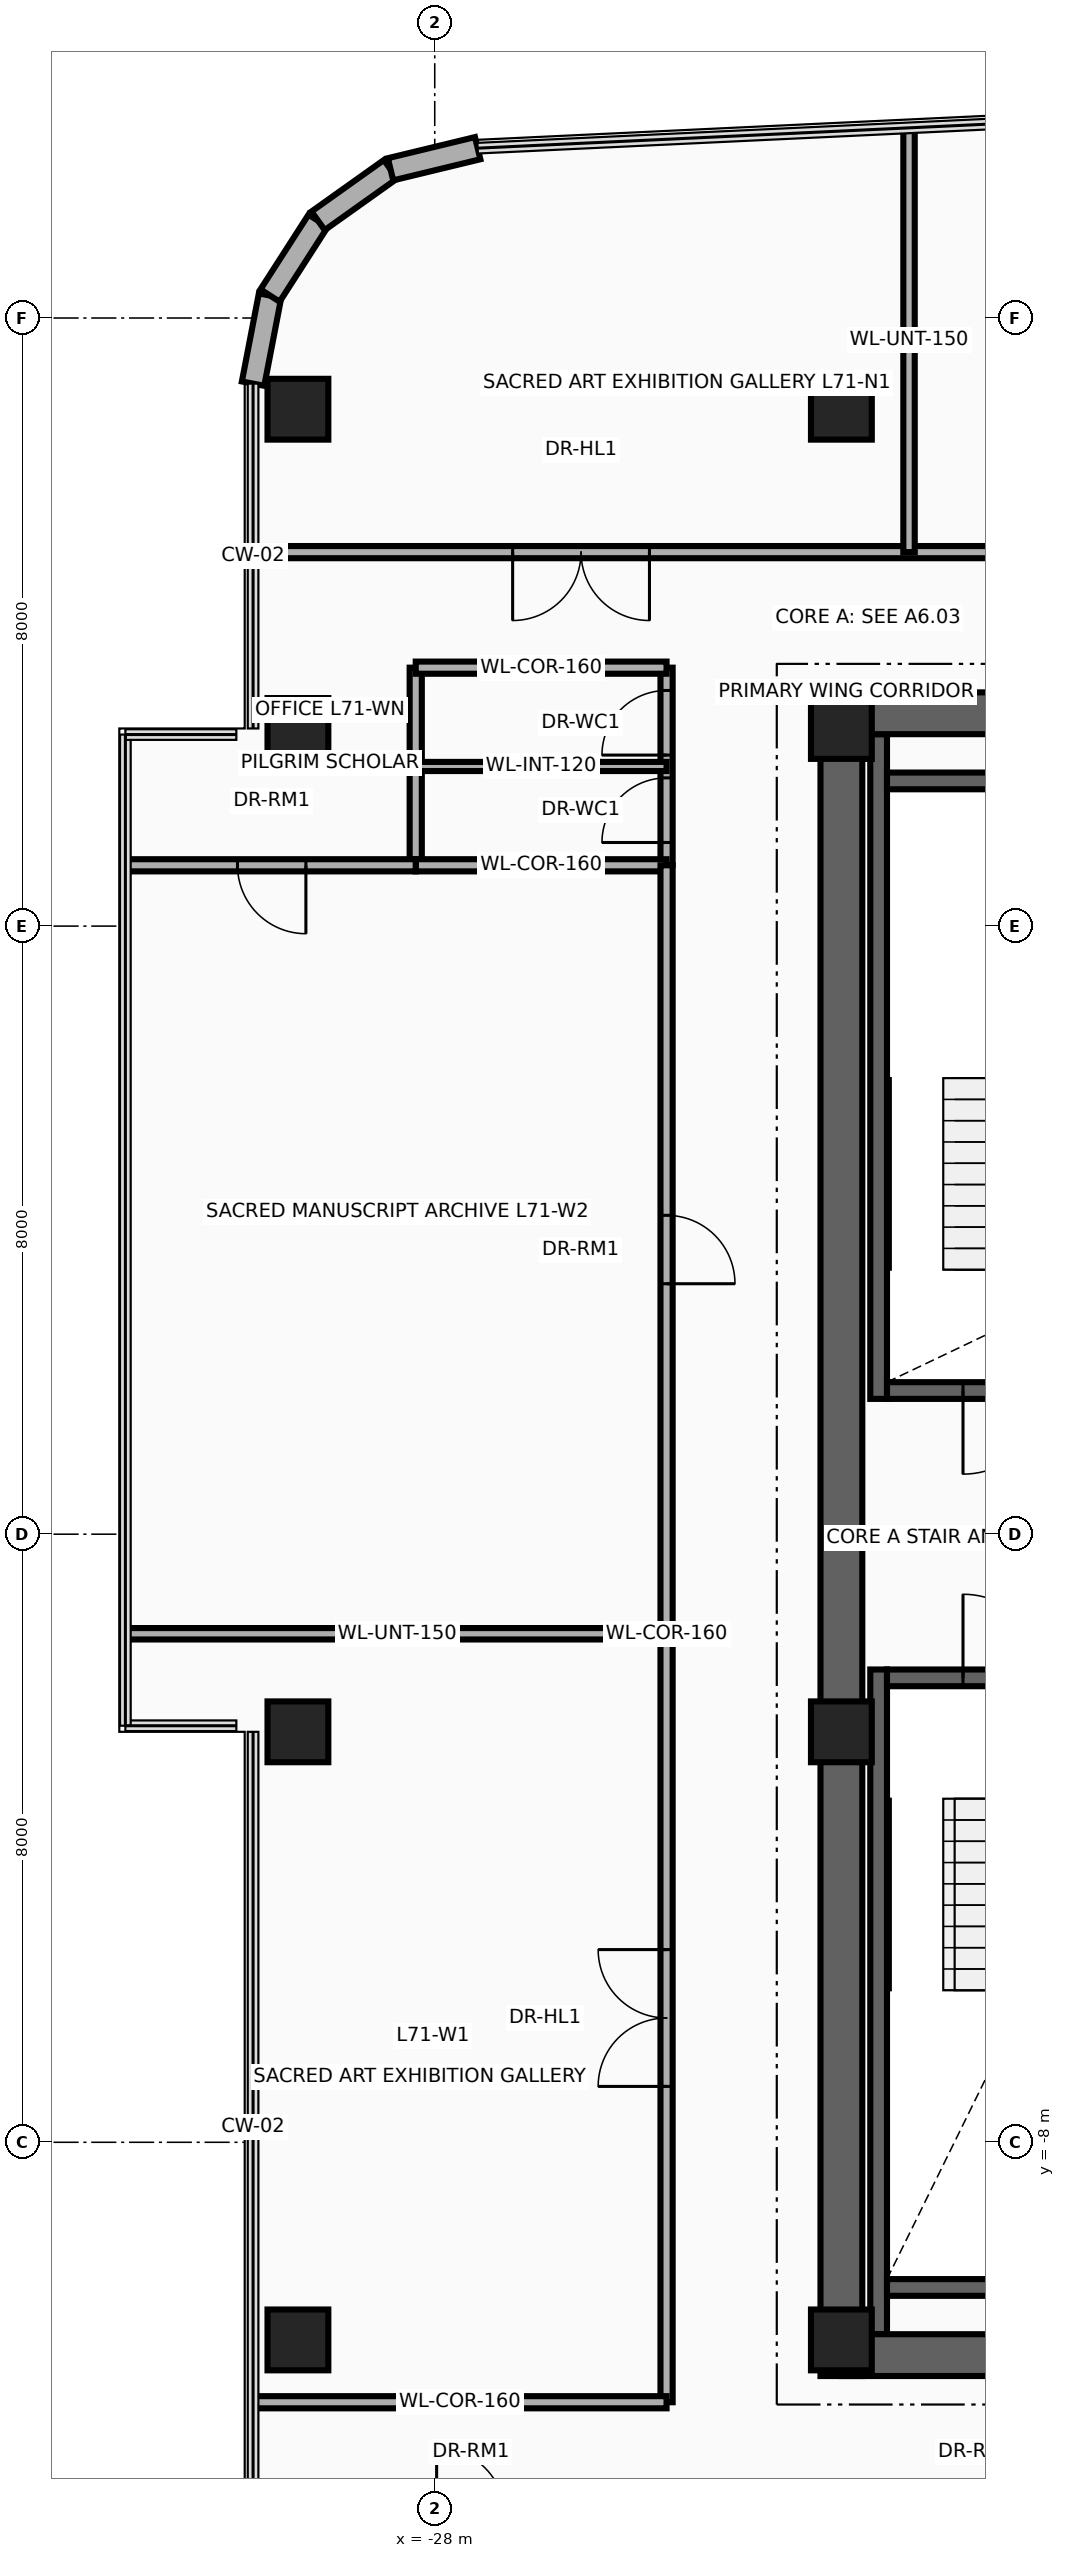
"""IFC4 building model, lengths in metres.
Left out: names, types, materials, properties, quantities, classifications, styles, units other than length and angle.
Written with IfcOpenShell. Run it as: python <this file> out.ifc"""

import sys

from ifc_helpers import new_model, si_unit, direction, frame, frame_2d, origin, origin_2d, place, context, subcontext, project, spatial, rectangle, extrude, source, transform, mapped, element, fill, save


model = new_model("IFC4")
c1 = context("Model", 3, precision=1e-05, world=origin(), true_north=direction((0.0, 1.0)))
c2 = subcontext(c1, "Body", "Model", "MODEL_VIEW")
j1 = project(units=[si_unit("LENGTHUNIT", "METRE"), si_unit("PLANEANGLEUNIT", "RADIAN")], contexts=[c1])
p1 = place(None, origin())
s1 = spatial("IfcSite", under=j1, at=p1, CompositionType="ELEMENT")
p2 = place(p1, origin())
s2 = spatial("IfcBuilding", under=s1, at=p2, CompositionType="ELEMENT")
p3 = place(p2, frame((0.0, 0.0, 273.0)))
s3 = spatial("IfcBuildingStorey", under=s2, at=p3, CompositionType="ELEMENT", Elevation=273.0)
p4 = place(p3, frame((-22.16, 1.78, 0.0), z_axis=(0.0, 0.0, 1.0), x_axis=(0.0, 1.0, 0.0)))
e1 = element("IfcWall", 1, at=p4, inside=s3, PredefinedType="SHEAR", context=c2, shape_type="SweptSolid", body=[
    extrude(rectangle(XDim=8.745, YDim=0.22, at=frame_2d((4.373, 0.0))), origin(), (0.0, 0.0, 1.0), 3.26),
])
p5 = place(p3, frame((-22.05, 1.89, 0.0), z_axis=(0.0, 0.0, 1.0), x_axis=(1.0, 0.0, 0.0)))
e2 = element("IfcWall", 2, at=p5, inside=s3, PredefinedType="SHEAR", context=c2, shape_type="SweptSolid", body=[
    extrude(rectangle(XDim=3.11, YDim=0.22, at=frame_2d((1.555, 0.0))), origin(), (0.0, 0.0, 1.0), 3.26),
])
p6 = place(p5, frame((1.0, 0.0, 0.0)))
e3 = element("IfcOpeningElement", 3, at=p6, cuts=e2, PredefinedType="OPENING", context=c2, shape_type="SweptSolid", body=[
    extrude(rectangle(XDim=1.1, YDim=2.15, at=frame_2d((0.55, 1.075))), frame((0.0, 0.125, 0.0), z_axis=(0.0, -1.0, 0.0), x_axis=(1.0, 0.0, 0.0)), (0.0, 0.0, 1.0), 0.25),
])
p7 = place(p3, frame((-22.05, 9.91, 0.0), z_axis=(0.0, 0.0, 1.0), x_axis=(1.0, 0.0, 0.0)))
e4 = element("IfcWall", 4, at=p7, inside=s3, PredefinedType="SHEAR", context=c2, shape_type="SweptSolid", body=[
    extrude(rectangle(XDim=3.11, YDim=0.22, at=frame_2d((1.555, 0.0))), origin(), (0.0, 0.0, 1.0), 3.26),
])
p8 = place(p3, frame((-22.16, -10.525, 0.0), z_axis=(0.0, 0.0, 1.0), x_axis=(0.0, 1.0, 0.0)))
e5 = element("IfcWall", 5, at=p8, inside=s3, PredefinedType="SHEAR", context=c2, shape_type="SweptSolid", body=[
    extrude(rectangle(XDim=8.745, YDim=0.22, at=frame_2d((4.373, 0.0))), origin(), (0.0, 0.0, 1.0), 3.26),
])
p9 = place(p3, frame((-22.05, -9.91, 0.0), z_axis=(0.0, 0.0, 1.0), x_axis=(1.0, 0.0, 0.0)))
e6 = element("IfcWall", 6, at=p9, inside=s3, PredefinedType="SHEAR", context=c2, shape_type="SweptSolid", body=[
    extrude(rectangle(XDim=3.11, YDim=0.22, at=frame_2d((1.555, 0.0))), origin(), (0.0, 0.0, 1.0), 3.26),
])
p10 = place(p3, frame((-22.05, -1.89, 0.0), z_axis=(0.0, 0.0, 1.0), x_axis=(1.0, 0.0, 0.0)))
e7 = element("IfcWall", 7, at=p10, inside=s3, PredefinedType="SHEAR", context=c2, shape_type="SweptSolid", body=[
    extrude(rectangle(XDim=3.11, YDim=0.22, at=frame_2d((1.555, 0.0))), origin(), (0.0, 0.0, 1.0), 3.26),
])
p11 = place(p10, frame((1.0, 0.0, 0.0)))
e8 = element("IfcOpeningElement", 8, at=p11, cuts=e7, PredefinedType="OPENING", context=c2, shape_type="SweptSolid", body=[
    extrude(rectangle(XDim=1.1, YDim=2.15, at=frame_2d((0.55, 1.075))), frame((0.0, 0.125, 0.0), z_axis=(0.0, -1.0, 0.0), x_axis=(1.0, 0.0, 0.0)), (0.0, 0.0, 1.0), 0.25),
])
p12 = place(p3, frame((-22.65, -11.075, 0.0), z_axis=(0.0, 0.0, 1.0), x_axis=(0.0, 1.0, 0.0)))
e9 = element("IfcWall", 9, at=p12, inside=s3, PredefinedType="SHEAR", context=c2, shape_type="SweptSolid", body=[
    extrude(rectangle(XDim=22.15, YDim=0.55, at=frame_2d((11.075, 0.0))), origin(), (0.0, 0.0, 1.0), 3.26),
])
for number, where, z_axis, x_axis in (
    (10, (-22.65, 10.8, 0.0), (0.0, 0.0, 1.0), (1.0, 0.0, 0.0)),
    (11, (-22.65, -10.8, 0.0), (0.0, 0.0, 1.0), (1.0, 0.0, 0.0)),
):
    element("IfcWall", number, at=place(p3, frame(where, z_axis=z_axis, x_axis=x_axis)), inside=s3, PredefinedType="SHEAR", context=c2, shape_type="SweptSolid", body=[
        extrude(rectangle(XDim=10.25, YDim=0.55, at=frame_2d((5.125, 0.0))), origin(), (0.0, 0.0, 1.0), 3.26),
    ])
m1 = source(origin(), c2, "Body", "SweptSolid", [
    extrude(rectangle(XDim=0.8, YDim=0.8, at=origin_2d()), origin(), (0.0, 0.0, 1.0), 3.5),
])
for number, where, z_axis, x_axis in (
    (12, (-29.8, -10.6, 0.0), (0.0, 0.0, 1.0), (1.0, 0.0, 0.0)),
    (13, (-22.65, -10.6, 0.0), (0.0, 0.0, 1.0), (1.0, 0.0, 0.0)),
    (14, (-29.8, -2.6, 0.0), (0.0, 0.0, 1.0), (1.0, 0.0, 0.0)),
    (15, (-22.65, -2.6, 0.0), (0.0, 0.0, 1.0), (1.0, 0.0, 0.0)),
    (16, (-29.8, 10.6, 0.0), (0.0, 0.0, 1.0), (1.0, 0.0, 0.0)),
    (17, (-22.65, 10.6, 0.0), (0.0, 0.0, 1.0), (1.0, 0.0, 0.0)),
    (18, (-29.8, 14.8, 0.0), (0.0, 0.0, 1.0), (1.0, 0.0, 0.0)),
    (19, (-22.65, 14.8, 0.0), (0.0, 0.0, 1.0), (1.0, 0.0, 0.0)),
):
    element("IfcColumn", number, at=place(p3, frame(where, z_axis=z_axis, x_axis=x_axis)), inside=s3, PredefinedType="COLUMN", context=c2, shape_type="MappedRepresentation", body=[
        mapped(m1, transform((0.0, 0.0, 0.0), x_axis=(1.0, 0.0, 0.0), y_axis=(0.0, 1.0, 0.0), z_axis=(0.0, 0.0, 1.0), scale=1.0)),
    ])
p13 = place(p3, frame((-30.39, 15.137, 0.0), z_axis=(0.0, 0.0, 1.0), x_axis=(0.189307792679, 0.981917796779, 0.0)))
e20 = element("IfcWall", 20, at=p13, inside=s3, PredefinedType="SOLIDWALL", context=c2, shape_type="SweptSolid", body=[
    extrude(rectangle(XDim=1.18, YDim=0.3, at=frame_2d((0.59, 0.0))), origin(), (0.0, 0.0, 1.0), 3.26),
])
p14 = place(p3, frame((-30.167, 16.295, 0.0), z_axis=(0.0, 0.0, 1.0), x_axis=(0.540842020947, 0.841124193195, 0.0)))
e21 = element("IfcWall", 21, at=p14, inside=s3, PredefinedType="SOLIDWALL", context=c2, shape_type="SweptSolid", body=[
    extrude(rectangle(XDim=1.169, YDim=0.3, at=frame_2d((0.584, 0.0))), origin(), (0.0, 0.0, 1.0), 3.26),
])
p15 = place(p3, frame((-29.534, 17.279, 0.0), z_axis=(0.0, 0.0, 1.0), x_axis=(0.81466371606, 0.579933642527, 0.0)))
e22 = element("IfcWall", 22, at=p15, inside=s3, PredefinedType="SOLIDWALL", context=c2, shape_type="SweptSolid", body=[
    extrude(rectangle(XDim=1.169, YDim=0.3, at=frame_2d((0.584, 0.0))), origin(), (0.0, 0.0, 1.0), 3.26),
])
p16 = place(p3, frame((-28.582, 17.957, 0.0), z_axis=(0.0, 0.0, 1.0), x_axis=(0.971929016595, 0.235274279725, 0.0)))
e23 = element("IfcWall", 23, at=p16, inside=s3, PredefinedType="SOLIDWALL", context=c2, shape_type="SweptSolid", body=[
    extrude(rectangle(XDim=1.18, YDim=0.3, at=frame_2d((0.59, 0.0))), origin(), (0.0, 0.0, 1.0), 3.26),
])
p17 = place(p3, frame((-28.25, 8.8, 0.0), z_axis=(0.0, 0.0, 1.0), x_axis=(0.0, 1.0, 0.0)))
e24 = element("IfcWall", 24, at=p17, inside=s3, PredefinedType="PARTITIONING", context=c2, shape_type="SweptSolid", body=[
    extrude(rectangle(XDim=2.6, YDim=0.16, at=frame_2d((1.3, 0.0))), origin(), (0.0, 0.0, 1.0), 2.623),
])
p18 = place(p3, frame((-24.95, 8.8, 0.0), z_axis=(0.0, 0.0, 1.0), x_axis=(0.0, 1.0, 0.0)))
e25 = element("IfcWall", 25, at=p18, inside=s3, PredefinedType="PARTITIONING", context=c2, shape_type="SweptSolid", body=[
    extrude(rectangle(XDim=2.6, YDim=0.16, at=frame_2d((1.3, 0.0))), origin(), (0.0, 0.0, 1.0), 2.623),
])
p19 = place(p18, frame((0.3, 0.0, 0.0)))
e26 = element("IfcOpeningElement", 26, at=p19, cuts=e25, PredefinedType="OPENING", context=c2, shape_type="SweptSolid", body=[
    extrude(rectangle(XDim=0.85, YDim=2.1, at=frame_2d((0.425, 1.05))), frame((0.0, 0.095, 0.0), z_axis=(0.0, -1.0, 0.0), x_axis=(1.0, 0.0, 0.0)), (0.0, 0.0, 1.0), 0.19),
])
p20 = place(p18, frame((1.45, 0.0, 0.0)))
e27 = element("IfcOpeningElement", 27, at=p20, cuts=e25, PredefinedType="OPENING", context=c2, shape_type="SweptSolid", body=[
    extrude(rectangle(XDim=0.85, YDim=2.1, at=frame_2d((0.425, 1.05))), frame((0.0, 0.095, 0.0), z_axis=(0.0, -1.0, 0.0), x_axis=(1.0, 0.0, 0.0)), (0.0, 0.0, 1.0), 0.19),
])
for number, where, z_axis, x_axis in (
    (28, (-28.25, 8.8, 0.0), (0.0, 0.0, 1.0), (1.0, 0.0, 0.0)),
    (29, (-28.25, 11.4, 0.0), (0.0, 0.0, 1.0), (1.0, 0.0, 0.0)),
):
    element("IfcWall", number, at=place(p3, frame(where, z_axis=z_axis, x_axis=x_axis)), inside=s3, PredefinedType="PARTITIONING", context=c2, shape_type="SweptSolid", body=[
        extrude(rectangle(XDim=3.3, YDim=0.16, at=frame_2d((1.65, 0.0))), origin(), (0.0, 0.0, 1.0), 3.26),
    ])
p21 = place(p3, frame((-28.25, 10.1, 0.0), z_axis=(0.0, 0.0, 1.0), x_axis=(1.0, 0.0, 0.0)))
e30 = element("IfcWall", 30, at=p21, inside=s3, PredefinedType="PARTITIONING", context=c2, shape_type="SweptSolid", body=[
    extrude(rectangle(XDim=3.3, YDim=0.12, at=frame_2d((1.65, 0.0))), origin(), (0.0, 0.0, 1.0), 3.26),
])
p22 = place(p3, frame((-24.95, -11.42, 0.0), z_axis=(0.0, 0.0, 1.0), x_axis=(0.0, 1.0, 0.0)))
e31 = element("IfcWall", 31, at=p22, inside=s3, PredefinedType="PARTITIONING", context=c2, shape_type="SweptSolid", body=[
    extrude(rectangle(XDim=20.22, YDim=0.16, at=frame_2d((10.11, 0.0))), origin(), (0.0, 0.0, 1.0), 2.623),
])
p23 = place(p22, frame((4.155, 0.0, 0.0)))
e32 = element("IfcOpeningElement", 32, at=p23, cuts=e31, PredefinedType="OPENING", context=c2, shape_type="SweptSolid", body=[
    extrude(rectangle(XDim=1.8, YDim=2.15, at=frame_2d((0.9, 1.075))), frame((0.0, 0.095, 0.0), z_axis=(0.0, -1.0, 0.0), x_axis=(1.0, 0.0, 0.0)), (0.0, 0.0, 1.0), 0.19),
])
p24 = place(p22, frame((14.715, 0.0, 0.0)))
e33 = element("IfcOpeningElement", 33, at=p24, cuts=e31, PredefinedType="OPENING", context=c2, shape_type="SweptSolid", body=[
    extrude(rectangle(XDim=0.9, YDim=2.1, at=frame_2d((0.45, 1.05))), frame((0.0, 0.095, 0.0), z_axis=(0.0, -1.0, 0.0), x_axis=(1.0, 0.0, 0.0)), (0.0, 0.0, 1.0), 0.19),
])
p25 = place(p3, frame((-32.04, 8.8, 0.0), z_axis=(0.0, 0.0, 1.0), x_axis=(1.0, 0.0, 0.0)))
e34 = element("IfcWall", 34, at=p25, inside=s3, PredefinedType="PARTITIONING", context=c2, shape_type="SweptSolid", body=[
    extrude(rectangle(XDim=3.79, YDim=0.16, at=frame_2d((1.895, 0.0))), origin(), (0.0, 0.0, 1.0), 2.706),
])
p26 = place(p25, frame((1.445, 0.0, 0.0)))
e35 = element("IfcOpeningElement", 35, at=p26, cuts=e34, PredefinedType="OPENING", context=c2, shape_type="SweptSolid", body=[
    extrude(rectangle(XDim=0.9, YDim=2.1, at=frame_2d((0.45, 1.05))), frame((0.0, 0.095, 0.0), z_axis=(0.0, -1.0, 0.0), x_axis=(1.0, 0.0, 0.0)), (0.0, 0.0, 1.0), 0.19),
])
p27 = place(p3, frame((-32.04, -1.31, 0.0), z_axis=(0.0, 0.0, 1.0), x_axis=(1.0, 0.0, 0.0)))
e36 = element("IfcWall", 36, at=p27, inside=s3, PredefinedType="PARTITIONING", context=c2, shape_type="SweptSolid", body=[
    extrude(rectangle(XDim=7.09, YDim=0.15, at=frame_2d((3.545, 0.0))), origin(), (0.0, 0.0, 1.0), 2.706),
])
p28 = place(p3, frame((-30.39, 12.92, 0.0), z_axis=(0.0, 0.0, 1.0), x_axis=(1.0, 0.0, 0.0)))
e37 = element("IfcWall", 37, at=p28, inside=s3, PredefinedType="PARTITIONING", context=c2, shape_type="SweptSolid", body=[
    extrude(rectangle(XDim=29.48, YDim=0.16, at=frame_2d((14.74, 0.0))), origin(), (0.0, 0.0, 1.0), 2.634),
])
p29 = place(p28, frame((3.415, 0.0, 0.0)))
e38 = element("IfcOpeningElement", 38, at=p29, cuts=e37, PredefinedType="OPENING", context=c2, shape_type="SweptSolid", body=[
    extrude(rectangle(XDim=1.8, YDim=2.15, at=frame_2d((0.9, 1.075))), frame((0.0, 0.095, 0.0), z_axis=(0.0, -1.0, 0.0), x_axis=(1.0, 0.0, 0.0)), (0.0, 0.0, 1.0), 0.19),
])
p30 = place(p28, frame((12.97, 0.0, 0.0)))
e39 = element("IfcOpeningElement", 39, at=p30, cuts=e37, PredefinedType="OPENING", context=c2, shape_type="SweptSolid", body=[
    extrude(rectangle(XDim=1.8, YDim=2.15, at=frame_2d((0.9, 1.075))), frame((0.0, 0.095, 0.0), z_axis=(0.0, -1.0, 0.0), x_axis=(1.0, 0.0, 0.0)), (0.0, 0.0, 1.0), 0.19),
])
p31 = place(p28, frame((23.395, 0.0, 0.0)))
e40 = element("IfcOpeningElement", 40, at=p31, cuts=e37, PredefinedType="OPENING", context=c2, shape_type="SweptSolid", body=[
    extrude(rectangle(XDim=1.8, YDim=2.15, at=frame_2d((0.9, 1.075))), frame((0.0, 0.095, 0.0), z_axis=(0.0, -1.0, 0.0), x_axis=(1.0, 0.0, 0.0)), (0.0, 0.0, 1.0), 0.19),
])
p32 = place(p3, frame((-21.76, 12.92, 0.0), z_axis=(0.0, 0.0, 1.0), x_axis=(0.0, 1.0, 0.0)))
e41 = element("IfcWall", 41, at=p32, inside=s3, PredefinedType="PARTITIONING", context=c2, shape_type="SweptSolid", body=[
    extrude(rectangle(XDim=5.582, YDim=0.15, at=frame_2d((2.791, 0.0))), origin(), (0.0, 0.0, 1.0), 2.623),
])
p33 = place(p3, frame((-30.39, -11.42, 0.0), z_axis=(0.0, 0.0, 1.0), x_axis=(1.0, 0.0, 0.0)))
e42 = element("IfcWall", 42, at=p33, inside=s3, PredefinedType="PARTITIONING", context=c2, shape_type="SweptSolid", body=[
    extrude(rectangle(XDim=5.44, YDim=0.16, at=frame_2d((2.72, 0.0))), origin(), (0.0, 0.0, 1.0), 3.26),
])
p34 = place(p6, frame((1.1, 0.0, 0.0), z_axis=(0.0, 0.0, 1.0), x_axis=(-1.0, 0.0, 0.0)))
e43 = element("IfcDoor", 43, at=p34, inside=s3, OperationType="SINGLE_SWING_LEFT", PredefinedType="DOOR", context=c2, shape_type="SweptSolid", body=[
    extrude(rectangle(XDim=1.1, YDim=2.15, at=frame_2d((0.55, 1.075))), frame((0.0, 0.025, 0.0), z_axis=(0.0, -1.0, 0.0), x_axis=(1.0, 0.0, 0.0)), (0.0, 0.0, 1.0), 0.05),
])
fill(e3, e43)
p35 = place(p11, origin())
e44 = element("IfcDoor", 44, at=p35, inside=s3, OperationType="SINGLE_SWING_RIGHT", PredefinedType="DOOR", context=c2, shape_type="SweptSolid", body=[
    extrude(rectangle(XDim=1.1, YDim=2.15, at=frame_2d((0.55, 1.075))), frame((0.0, 0.025, 0.0), z_axis=(0.0, -1.0, 0.0), x_axis=(1.0, 0.0, 0.0)), (0.0, 0.0, 1.0), 0.05),
])
fill(e8, e44)
p36 = place(p19, origin())
e45 = element("IfcDoor", 45, at=p36, inside=s3, OperationType="SINGLE_SWING_LEFT", PredefinedType="DOOR", context=c2, shape_type="SweptSolid", body=[
    extrude(rectangle(XDim=0.85, YDim=2.1, at=frame_2d((0.425, 1.05))), frame((0.0, 0.025, 0.0), z_axis=(0.0, -1.0, 0.0), x_axis=(1.0, 0.0, 0.0)), (0.0, 0.0, 1.0), 0.05),
])
fill(e26, e45)
p37 = place(p20, origin())
e46 = element("IfcDoor", 46, at=p37, inside=s3, OperationType="SINGLE_SWING_RIGHT", PredefinedType="DOOR", context=c2, shape_type="SweptSolid", body=[
    extrude(rectangle(XDim=0.85, YDim=2.1, at=frame_2d((0.425, 1.05))), frame((0.0, 0.025, 0.0), z_axis=(0.0, -1.0, 0.0), x_axis=(1.0, 0.0, 0.0)), (0.0, 0.0, 1.0), 0.05),
])
fill(e27, e46)
p38 = place(p26, frame((0.9, 0.0, 0.0), z_axis=(0.0, 0.0, 1.0), x_axis=(-1.0, 0.0, 0.0)))
e47 = element("IfcDoor", 47, at=p38, inside=s3, OperationType="SINGLE_SWING_LEFT", PredefinedType="DOOR", context=c2, shape_type="SweptSolid", body=[
    extrude(rectangle(XDim=0.9, YDim=2.1, at=frame_2d((0.45, 1.05))), frame((0.0, 0.025, 0.0), z_axis=(0.0, -1.0, 0.0), x_axis=(1.0, 0.0, 0.0)), (0.0, 0.0, 1.0), 0.05),
])
fill(e35, e47)
p39 = place(p23, origin())
e48 = element("IfcDoor", 48, at=p39, inside=s3, OperationType="DOUBLE_DOOR_SINGLE_SWING", PredefinedType="DOOR", context=c2, shape_type="SweptSolid", body=[
    extrude(rectangle(XDim=1.8, YDim=2.15, at=frame_2d((0.9, 1.075))), frame((0.0, 0.025, 0.0), z_axis=(0.0, -1.0, 0.0), x_axis=(1.0, 0.0, 0.0)), (0.0, 0.0, 1.0), 0.05),
])
fill(e32, e48)
p40 = place(p24, frame((0.9, 0.0, 0.0), z_axis=(0.0, 0.0, 1.0), x_axis=(-1.0, 0.0, 0.0)))
e49 = element("IfcDoor", 49, at=p40, inside=s3, OperationType="SINGLE_SWING_LEFT", PredefinedType="DOOR", context=c2, shape_type="SweptSolid", body=[
    extrude(rectangle(XDim=0.9, YDim=2.1, at=frame_2d((0.45, 1.05))), frame((0.0, 0.025, 0.0), z_axis=(0.0, -1.0, 0.0), x_axis=(1.0, 0.0, 0.0)), (0.0, 0.0, 1.0), 0.05),
])
fill(e33, e49)
p41 = place(p29, frame((1.8, 0.0, 0.0), z_axis=(0.0, 0.0, 1.0), x_axis=(-1.0, 0.0, 0.0)))
e50 = element("IfcDoor", 50, at=p41, inside=s3, OperationType="DOUBLE_DOOR_SINGLE_SWING", PredefinedType="DOOR", context=c2, shape_type="SweptSolid", body=[
    extrude(rectangle(XDim=1.8, YDim=2.15, at=frame_2d((0.9, 1.075))), frame((0.0, 0.025, 0.0), z_axis=(0.0, -1.0, 0.0), x_axis=(1.0, 0.0, 0.0)), (0.0, 0.0, 1.0), 0.05),
])
fill(e38, e50)
save(model, sys.argv[1])
